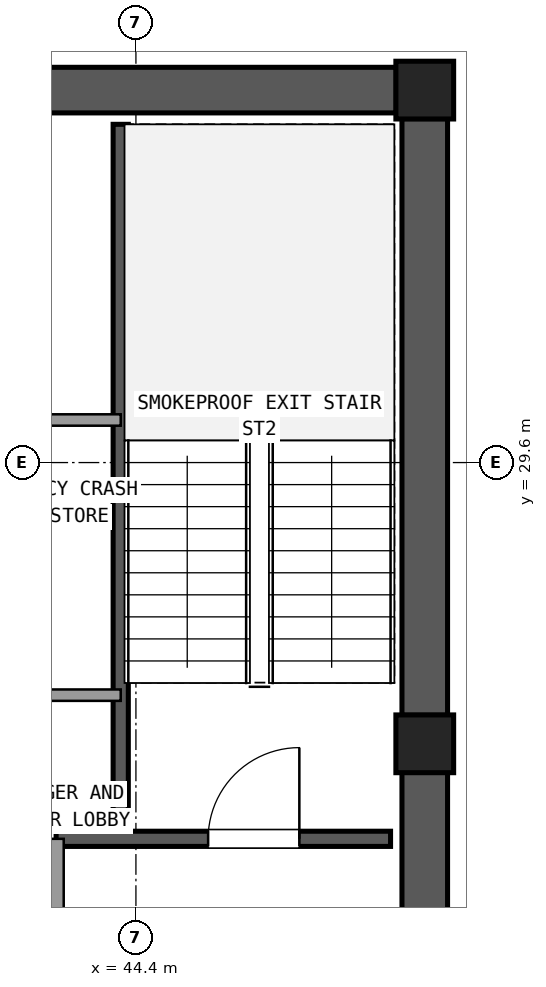
"""IFC4 building model, lengths in metres.
Left out: names, types, materials, properties, quantities, classifications, styles, units other than length and angle.
Written with IfcOpenShell. Run it as: python <this file> out.ifc"""

import sys

from ifc_helpers import new_model, si_unit, direction, frame, frame_2d, origin, origin_2d, place, context, subcontext, project, spatial, rectangle, extrude, element, fill, save


model = new_model("IFC4")
c1 = context("Model", 3, precision=1e-05, world=origin(), true_north=direction((0.0, 1.0)))
c2 = subcontext(c1, "Body", "Model", "MODEL_VIEW")
j1 = project(units=[si_unit("LENGTHUNIT", "METRE"), si_unit("PLANEANGLEUNIT", "RADIAN")], contexts=[c1])
p1 = place(None, origin())
s1 = spatial("IfcSite", under=j1, at=p1, CompositionType="ELEMENT")
p2 = place(p1, origin())
s2 = spatial("IfcBuilding", under=s1, at=p2, CompositionType="ELEMENT")
p3 = place(p2, frame((0.0, 0.0, 290.34)))
s3 = spatial("IfcBuildingStorey", under=s2, at=p3, CompositionType="ELEMENT", Elevation=290.34)
for number, where, z_axis, x_axis in (
    (1, (48.2, 25.9, 0.0), (0.0, 0.0, 1.0), (1.0, 0.0, 0.0)),
    (2, (48.2, 34.5, 0.0), (0.0, 0.0, 1.0), (1.0, 0.0, 0.0)),
):
    element("IfcColumn", number, at=place(p3, frame(where, z_axis=z_axis, x_axis=x_axis)), inside=s3, PredefinedType="COLUMN", context=c2, shape_type="SweptSolid", body=[
        extrude(rectangle(XDim=0.76, YDim=0.76, at=origin_2d()), origin(), (0.0, 0.0, 1.0), 4.32),
    ])
p4 = place(p3, frame((48.2, 17.675, 0.0), z_axis=(0.0, 0.0, 1.0), x_axis=(0.0, 1.0, 0.0)))
e3 = element("IfcWall", 3, at=p4, inside=s3, PredefinedType="SHEAR", context=c2, shape_type="SweptSolid", body=[
    extrude(rectangle(XDim=7.85, YDim=0.6, at=frame_2d((3.925, 0.0))), origin(), (0.0, 0.0, 1.0), 4.02),
])
p5 = place(p4, frame((4.375, 0.0, 0.0)))
e4 = element("IfcOpeningElement", 4, at=p5, cuts=e3, PredefinedType="OPENING", context=c2, shape_type="SweptSolid", body=[
    extrude(rectangle(XDim=1.2, YDim=2.15, at=frame_2d((0.6, 1.075))), frame((0.0, 0.31, 0.0), z_axis=(0.0, -1.0, 0.0), x_axis=(1.0, 0.0, 0.0)), (0.0, 0.0, 1.0), 0.62),
])
p6 = place(p3, frame((48.2, 26.275, 0.0), z_axis=(0.0, 0.0, 1.0), x_axis=(0.0, 1.0, 0.0)))
e5 = element("IfcWall", 5, at=p6, inside=s3, PredefinedType="SHEAR", context=c2, shape_type="SweptSolid", body=[
    extrude(rectangle(XDim=7.85, YDim=0.6, at=frame_2d((3.925, 0.0))), origin(), (0.0, 0.0, 1.0), 4.02),
])
p7 = place(p3, frame((47.825, 34.5, 0.0), z_axis=(0.0, 0.0, 1.0), x_axis=(-1.0, 0.0, 0.0)))
e6 = element("IfcWall", 6, at=p7, inside=s3, PredefinedType="SHEAR", context=c2, shape_type="SweptSolid", body=[
    extrude(rectangle(XDim=10.45, YDim=0.6, at=frame_2d((5.225, 0.0))), origin(), (0.0, 0.0, 1.0), 4.02),
])
p8 = place(p7, frame((4.725, 0.0, 0.0)))
e7 = element("IfcOpeningElement", 7, at=p8, cuts=e6, PredefinedType="OPENING", context=c2, shape_type="SweptSolid", body=[
    extrude(rectangle(XDim=1.6, YDim=2.2, at=frame_2d((0.8, 1.1))), frame((0.0, 0.31, 0.0), z_axis=(0.0, -1.0, 0.0), x_axis=(1.0, 0.0, 0.0)), (0.0, 0.0, 1.0), 0.62),
])
p9 = place(p3, frame((44.2, 24.65, 0.0), z_axis=(0.0, 0.0, 1.0), x_axis=(0.0, 1.0, 0.0)))
e8 = element("IfcWall", 8, at=p9, inside=s3, PredefinedType="SHEAR", context=c2, shape_type="SweptSolid", body=[
    extrude(rectangle(XDim=9.4, YDim=0.2, at=frame_2d((4.7, 0.0))), origin(), (0.0, 0.0, 1.0), 4.02),
])
p10 = place(p3, frame((43.35, 24.65, 0.0), z_axis=(0.0, 0.0, 1.0), x_axis=(1.0, 0.0, 0.0)))
e9 = element("IfcWall", 9, at=p10, inside=s3, PredefinedType="SHEAR", context=c2, shape_type="SweptSolid", body=[
    extrude(rectangle(XDim=4.4, YDim=0.2, at=frame_2d((2.2, 0.0))), origin(), (0.0, 0.0, 1.0), 4.02),
])
p11 = place(p10, frame((2.0, 0.0, 0.0)))
e10 = element("IfcOpeningElement", 10, at=p11, cuts=e9, PredefinedType="OPENING", context=c2, shape_type="SweptSolid", body=[
    extrude(rectangle(XDim=1.2, YDim=2.15, at=frame_2d((0.6, 1.075))), frame((0.0, 0.11, 0.0), z_axis=(0.0, -1.0, 0.0), x_axis=(1.0, 0.0, 0.0)), (0.0, 0.0, 1.0), 0.22),
])
p12 = place(p3, frame((43.35, 17.75, 0.0), z_axis=(0.0, 0.0, 1.0), x_axis=(0.0, 1.0, 0.0)))
e11 = element("IfcWall", 11, at=p12, inside=s3, PredefinedType="SOLIDWALL", context=c2, shape_type="SweptSolid", body=[
    extrude(rectangle(XDim=6.9, YDim=0.2, at=frame_2d((3.45, 0.0))), origin(), (0.0, 0.0, 1.0), 2.93),
])
p13 = place(p12, frame((4.15, 0.0, 0.0)))
e12 = element("IfcOpeningElement", 12, at=p13, cuts=e11, PredefinedType="OPENING", context=c2, shape_type="SweptSolid", body=[
    extrude(rectangle(XDim=1.2, YDim=2.15, at=frame_2d((0.6, 1.075))), frame((0.0, 0.11, 0.0), z_axis=(0.0, -1.0, 0.0), x_axis=(1.0, 0.0, 0.0)), (0.0, 0.0, 1.0), 0.22),
])
for number, where, z_axis, x_axis in (
    (13, (42.27, 26.54, 0.0), (0.0, 0.0, 1.0), (1.0, 0.0, 0.0)),
    (14, (42.27, 30.16, 0.0), (0.0, 0.0, 1.0), (1.0, 0.0, 0.0)),
):
    element("IfcWall", number, at=place(p3, frame(where, z_axis=z_axis, x_axis=x_axis)), inside=s3, PredefinedType="PARTITIONING", context=c2, shape_type="SweptSolid", body=[
        extrude(rectangle(XDim=1.93, YDim=0.15, at=frame_2d((0.965, 0.0))), origin(), (0.0, 0.0, 1.0), 2.93),
    ])
p14 = place(p11, origin())
e15 = element("IfcDoor", 15, at=p14, inside=s3, OperationType="SINGLE_SWING_RIGHT", PredefinedType="DOOR", context=c2, shape_type="SweptSolid", body=[
    extrude(rectangle(XDim=1.2, YDim=2.15, at=frame_2d((0.6, 1.075))), frame((0.0, 0.025, 0.0), z_axis=(0.0, -1.0, 0.0), x_axis=(1.0, 0.0, 0.0)), (0.0, 0.0, 1.0), 0.05),
])
fill(e10, e15)
save(model, sys.argv[1])
